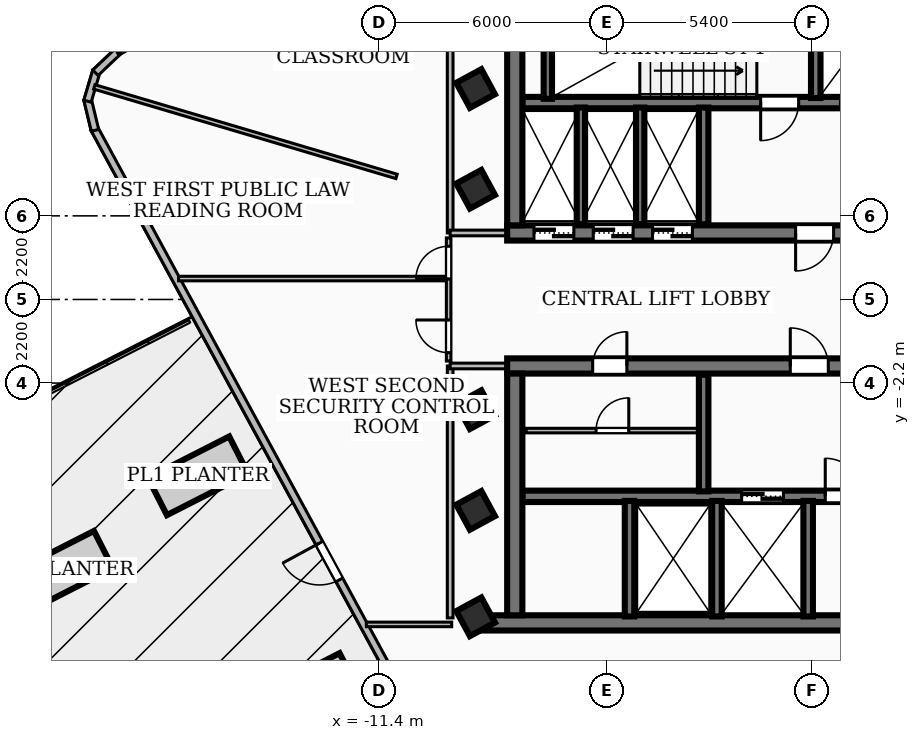
"""IFC4 building model, lengths in metres.
Left out: names, types, materials, properties, quantities, classifications, styles, units other than length and angle.
Written with IfcOpenShell. Run it as: python <this file> out.ifc"""

import sys

from ifc_helpers import new_model, si_unit, direction, frame, frame_2d, origin, origin_2d, place, context, subcontext, project, spatial, rectangle, extrude, element, fill, save


model = new_model("IFC4")
c1 = context("Model", 3, precision=1e-05, world=origin(), true_north=direction((0.0, 1.0)))
c2 = subcontext(c1, "Body", "Model", "MODEL_VIEW")
j1 = project(units=[si_unit("LENGTHUNIT", "METRE"), si_unit("PLANEANGLEUNIT", "RADIAN")], contexts=[c1])
p1 = place(None, origin())
s1 = spatial("IfcSite", under=j1, at=p1, CompositionType="ELEMENT")
p2 = place(p1, origin())
s2 = spatial("IfcBuilding", under=s1, at=p2, CompositionType="ELEMENT")
p3 = place(p2, frame((0.0, 0.0, 200.88)))
s3 = spatial("IfcBuildingStorey", under=s2, at=p3, CompositionType="ELEMENT", Elevation=200.88)
p4 = place(p3, frame((8.02, 1.75, 0.0), z_axis=(0.0, 0.0, 1.0), x_axis=(-1.0, 0.0, 0.0)))
e1 = element("IfcWall", 1, at=p4, inside=s3, PredefinedType="SHEAR", context=c2, shape_type="SweptSolid", body=[
    extrude(rectangle(XDim=16.04, YDim=0.4, at=frame_2d((8.02, 0.0))), origin(), (0.0, 0.0, 1.0), 4.06),
])
p5 = place(p4, frame((7.45, 0.0, 0.0)))
e2 = element("IfcOpeningElement", 2, at=p5, cuts=e1, PredefinedType="OPENING", context=c2, shape_type="SweptSolid", body=[
    extrude(rectangle(XDim=1.0, YDim=2.1, at=frame_2d((0.5, 1.05))), frame((0.0, 0.21, 0.0), z_axis=(0.0, -1.0, 0.0), x_axis=(1.0, 0.0, 0.0)), (0.0, 0.0, 1.0), 0.42),
])
p6 = place(p4, frame((14.285, 0.0, 0.0)))
e3 = element("IfcOpeningElement", 3, at=p6, cuts=e1, PredefinedType="OPENING", context=c2, shape_type="SweptSolid", body=[
    extrude(rectangle(XDim=1.05, YDim=2.15, at=frame_2d((0.525, 1.075))), frame((0.0, 0.21, 0.0), z_axis=(0.0, -1.0, 0.0), x_axis=(1.0, 0.0, 0.0)), (0.0, 0.0, 1.0), 0.42),
])
p7 = place(p4, frame((12.725, 0.0, 0.0)))
e4 = element("IfcOpeningElement", 4, at=p7, cuts=e1, PredefinedType="OPENING", context=c2, shape_type="SweptSolid", body=[
    extrude(rectangle(XDim=1.05, YDim=2.15, at=frame_2d((0.525, 1.075))), frame((0.0, 0.21, 0.0), z_axis=(0.0, -1.0, 0.0), x_axis=(1.0, 0.0, 0.0)), (0.0, 0.0, 1.0), 0.42),
])
p8 = place(p4, frame((11.165, 0.0, 0.0)))
e5 = element("IfcOpeningElement", 5, at=p8, cuts=e1, PredefinedType="OPENING", context=c2, shape_type="SweptSolid", body=[
    extrude(rectangle(XDim=1.05, YDim=2.15, at=frame_2d((0.525, 1.075))), frame((0.0, 0.21, 0.0), z_axis=(0.0, -1.0, 0.0), x_axis=(1.0, 0.0, 0.0)), (0.0, 0.0, 1.0), 0.42),
])
p9 = place(p4, frame((3.85, 0.0, 0.0)))
e6 = element("IfcOpeningElement", 6, at=p9, cuts=e1, PredefinedType="OPENING", context=c2, shape_type="SweptSolid", body=[
    extrude(rectangle(XDim=0.9, YDim=2.06, at=frame_2d((0.45, 1.03))), frame((0.0, 0.21, 0.0), z_axis=(0.0, -1.0, 0.0), x_axis=(1.0, 0.0, 0.0)), (0.0, 0.0, 1.0), 0.42),
])
p10 = place(p4, frame((2.35, 0.0, 0.0)))
e7 = element("IfcOpeningElement", 7, at=p10, cuts=e1, PredefinedType="OPENING", context=c2, shape_type="SweptSolid", body=[
    extrude(rectangle(XDim=0.9, YDim=2.06, at=frame_2d((0.45, 1.03))), frame((0.0, 0.21, 0.0), z_axis=(0.0, -1.0, 0.0), x_axis=(1.0, 0.0, 0.0)), (0.0, 0.0, 1.0), 0.42),
])
p11 = place(p4, frame((0.8, 0.0, 0.0)))
e8 = element("IfcOpeningElement", 8, at=p11, cuts=e1, PredefinedType="OPENING", context=c2, shape_type="SweptSolid", body=[
    extrude(rectangle(XDim=0.9, YDim=2.06, at=frame_2d((0.45, 1.03))), frame((0.0, 0.21, 0.0), z_axis=(0.0, -1.0, 0.0), x_axis=(1.0, 0.0, 0.0)), (0.0, 0.0, 1.0), 0.42),
])
p12 = place(p3, frame((-7.82, 1.95, 0.0), z_axis=(0.0, 0.0, 1.0), x_axis=(0.0, 1.0, 0.0)))
e9 = element("IfcWall", 9, at=p12, inside=s3, PredefinedType="SHEAR", context=c2, shape_type="SweptSolid", body=[
    extrude(rectangle(XDim=6.36, YDim=0.4, at=frame_2d((3.18, 0.0))), origin(), (0.0, 0.0, 1.0), 4.06),
])
p13 = place(p3, frame((7.62, 5.18, 0.0), z_axis=(0.0, 0.0, 1.0), x_axis=(-1.0, 0.0, 0.0)))
e10 = element("IfcWall", 10, at=p13, inside=s3, PredefinedType="SOLIDWALL", context=c2, shape_type="SweptSolid", body=[
    extrude(rectangle(XDim=15.24, YDim=0.3, at=frame_2d((7.62, 0.0))), origin(), (0.0, 0.0, 1.0), 4.06),
])
p14 = place(p13, frame((5.77, 0.0, 0.0)))
e11 = element("IfcOpeningElement", 11, at=p14, cuts=e10, PredefinedType="OPENING", context=c2, shape_type="SweptSolid", body=[
    extrude(rectangle(XDim=1.1, YDim=2.15, at=frame_2d((0.55, 1.075))), frame((0.0, 0.16, 0.0), z_axis=(0.0, -1.0, 0.0), x_axis=(1.0, 0.0, 0.0)), (0.0, 0.0, 1.0), 0.32),
])
p15 = place(p13, frame((2.97, 0.0, 0.0)))
e12 = element("IfcOpeningElement", 12, at=p15, cuts=e10, PredefinedType="OPENING", context=c2, shape_type="SweptSolid", body=[
    extrude(rectangle(XDim=1.1, YDim=2.15, at=frame_2d((0.55, 1.075))), frame((0.0, 0.16, 0.0), z_axis=(0.0, -1.0, 0.0), x_axis=(1.0, 0.0, 0.0)), (0.0, 0.0, 1.0), 0.32),
])
p16 = place(p13, frame((7.97, 0.0, 0.0)))
e13 = element("IfcOpeningElement", 13, at=p16, cuts=e10, PredefinedType="OPENING", context=c2, shape_type="SweptSolid", body=[
    extrude(rectangle(XDim=1.0, YDim=2.1, at=frame_2d((0.5, 1.05))), frame((0.0, 0.16, 0.0), z_axis=(0.0, -1.0, 0.0), x_axis=(1.0, 0.0, 0.0)), (0.0, 0.0, 1.0), 0.32),
])
p17 = place(p3, frame((8.78, -8.51, 0.0), z_axis=(0.0, 0.0, 1.0), x_axis=(-1.0, 0.0, 0.0)))
e14 = element("IfcWall", 14, at=p17, inside=s3, PredefinedType="SHEAR", context=c2, shape_type="SweptSolid", body=[
    extrude(rectangle(XDim=17.56, YDim=0.4, at=frame_2d((8.78, 0.0))), origin(), (0.0, 0.0, 1.0), 4.06),
])
p18 = place(p3, frame((-8.02, -1.75, 0.0), z_axis=(0.0, 0.0, 1.0), x_axis=(1.0, 0.0, 0.0)))
e15 = element("IfcWall", 15, at=p18, inside=s3, PredefinedType="SHEAR", context=c2, shape_type="SweptSolid", body=[
    extrude(rectangle(XDim=16.04, YDim=0.4, at=frame_2d((8.02, 0.0))), origin(), (0.0, 0.0, 1.0), 4.06),
])
p19 = place(p18, frame((7.45, 0.0, 0.0)))
e16 = element("IfcOpeningElement", 16, at=p19, cuts=e15, PredefinedType="OPENING", context=c2, shape_type="SweptSolid", body=[
    extrude(rectangle(XDim=1.0, YDim=2.1, at=frame_2d((0.5, 1.05))), frame((0.0, 0.21, 0.0), z_axis=(0.0, -1.0, 0.0), x_axis=(1.0, 0.0, 0.0)), (0.0, 0.0, 1.0), 0.42),
])
p20 = place(p18, frame((12.65, 0.0, 0.0)))
e17 = element("IfcOpeningElement", 17, at=p20, cuts=e15, PredefinedType="OPENING", context=c2, shape_type="SweptSolid", body=[
    extrude(rectangle(XDim=0.9, YDim=2.06, at=frame_2d((0.45, 1.03))), frame((0.0, 0.21, 0.0), z_axis=(0.0, -1.0, 0.0), x_axis=(1.0, 0.0, 0.0)), (0.0, 0.0, 1.0), 0.42),
])
p21 = place(p18, frame((2.25, 0.0, 0.0)))
e18 = element("IfcOpeningElement", 18, at=p21, cuts=e15, PredefinedType="OPENING", context=c2, shape_type="SweptSolid", body=[
    extrude(rectangle(XDim=0.9, YDim=2.06, at=frame_2d((0.45, 1.03))), frame((0.0, 0.21, 0.0), z_axis=(0.0, -1.0, 0.0), x_axis=(1.0, 0.0, 0.0)), (0.0, 0.0, 1.0), 0.42),
])
p22 = place(p3, frame((-7.82, -8.31, 0.0), z_axis=(0.0, 0.0, 1.0), x_axis=(0.0, 1.0, 0.0)))
e19 = element("IfcWall", 19, at=p22, inside=s3, PredefinedType="SHEAR", context=c2, shape_type="SweptSolid", body=[
    extrude(rectangle(XDim=6.36, YDim=0.4, at=frame_2d((3.18, 0.0))), origin(), (0.0, 0.0, 1.0), 4.06),
])
p23 = place(p3, frame((-7.62, -5.18, 0.0), z_axis=(0.0, 0.0, 1.0), x_axis=(1.0, 0.0, 0.0)))
e20 = element("IfcWall", 20, at=p23, inside=s3, PredefinedType="SOLIDWALL", context=c2, shape_type="SweptSolid", body=[
    extrude(rectangle(XDim=15.24, YDim=0.3, at=frame_2d((7.62, 0.0))), origin(), (0.0, 0.0, 1.0), 4.06),
])
p24 = place(p23, frame((5.77, 0.0, 0.0)))
e21 = element("IfcOpeningElement", 21, at=p24, cuts=e20, PredefinedType="OPENING", context=c2, shape_type="SweptSolid", body=[
    extrude(rectangle(XDim=1.1, YDim=2.15, at=frame_2d((0.55, 1.075))), frame((0.0, 0.16, 0.0), z_axis=(0.0, -1.0, 0.0), x_axis=(1.0, 0.0, 0.0)), (0.0, 0.0, 1.0), 0.32),
])
p25 = place(p23, frame((7.97, 0.0, 0.0)))
e22 = element("IfcOpeningElement", 22, at=p25, cuts=e20, PredefinedType="OPENING", context=c2, shape_type="SweptSolid", body=[
    extrude(rectangle(XDim=1.0, YDim=2.1, at=frame_2d((0.5, 1.05))), frame((0.0, 0.16, 0.0), z_axis=(0.0, -1.0, 0.0), x_axis=(1.0, 0.0, 0.0)), (0.0, 0.0, 1.0), 0.32),
])
p26 = place(p3, frame((-6.95, 5.28, 0.0), z_axis=(0.0, 0.0, 1.0), x_axis=(0.0, 1.0, 0.0)))
e23 = element("IfcWall", 23, at=p26, inside=s3, PredefinedType="SOLIDWALL", context=c2, shape_type="SweptSolid", body=[
    extrude(rectangle(XDim=3.06, YDim=0.22, at=frame_2d((1.53, 0.0))), origin(), (0.0, 0.0, 1.0), 4.06),
])
p27 = place(p3, frame((0.1, 5.3, 0.0), z_axis=(0.0, 0.0, 1.0), x_axis=(0.0, 1.0, 0.0)))
e24 = element("IfcWall", 24, at=p27, inside=s3, PredefinedType="SOLIDWALL", context=c2, shape_type="SweptSolid", body=[
    extrude(rectangle(XDim=3.04, YDim=0.25, at=frame_2d((1.52, 0.0))), origin(), (0.0, 0.0, 1.0), 4.06),
])
p28 = place(p3, frame((-2.85, 1.98, 0.0), z_axis=(0.0, 0.0, 1.0), x_axis=(0.0, 1.0, 0.0)))
e25 = element("IfcWall", 25, at=p28, inside=s3, PredefinedType="SOLIDWALL", context=c2, shape_type="SweptSolid", body=[
    extrude(rectangle(XDim=3.07, YDim=0.25, at=frame_2d((1.535, 0.0))), origin(), (0.0, 0.0, 1.0), 4.06),
])
for number, where, z_axis, x_axis in (
    (26, (-0.1, -8.34, 0.0), (0.0, 0.0, 1.0), (0.0, 1.0, 0.0)),
    (27, (-2.5, -8.34, 0.0), (0.0, 0.0, 1.0), (0.0, 1.0, 0.0)),
    (28, (-4.8, -8.34, 0.0), (0.0, 0.0, 1.0), (0.0, 1.0, 0.0)),
):
    element("IfcWall", number, at=place(p3, frame(where, z_axis=z_axis, x_axis=x_axis)), inside=s3, PredefinedType="SOLIDWALL", context=c2, shape_type="SweptSolid", body=[
        extrude(rectangle(XDim=3.04, YDim=0.25, at=frame_2d((1.52, 0.0))), origin(), (0.0, 0.0, 1.0), 4.06),
    ])
p29 = place(p3, frame((-2.85, -5.05, 0.0), z_axis=(0.0, 0.0, 1.0), x_axis=(0.0, 1.0, 0.0)))
e29 = element("IfcWall", 29, at=p29, inside=s3, PredefinedType="SOLIDWALL", context=c2, shape_type="SweptSolid", body=[
    extrude(rectangle(XDim=3.07, YDim=0.25, at=frame_2d((1.535, 0.0))), origin(), (0.0, 0.0, 1.0), 4.06),
])
for number, where, z_axis, x_axis in (
    (30, (-6.08, 1.98, 0.0), (0.0, 0.0, 1.0), (0.0, 1.0, 0.0)),
    (31, (-4.52, 1.98, 0.0), (0.0, 0.0, 1.0), (0.0, 1.0, 0.0)),
):
    element("IfcWall", number, at=place(p3, frame(where, z_axis=z_axis, x_axis=x_axis)), inside=s3, PredefinedType="SOLIDWALL", context=c2, shape_type="SweptSolid", body=[
        extrude(rectangle(XDim=3.07, YDim=0.22, at=frame_2d((1.535, 0.0))), origin(), (0.0, 0.0, 1.0), 4.06),
    ])
for number, where, z_axis, x_axis in (
    (32, (-8.85, -5.55, 0.0), (0.0, 0.0, 1.0), (0.879, 0.477, 0.0)),
    (33, (-8.85, -2.9, 0.0), (0.0, 0.0, 1.0), (0.879, 0.477, 0.0)),
    (34, (-8.85, 2.9, 0.0), (0.0, 0.0, 1.0), (0.879, 0.477, 0.0)),
    (35, (-8.85, 5.55, 0.0), (0.0, 0.0, 1.0), (0.879, 0.477, 0.0)),
    (36, (-8.85, -8.35, 0.0), (0.0, 0.0, 1.0), (0.879, 0.477, 0.0)),
):
    element("IfcColumn", number, at=place(p3, frame(where, z_axis=z_axis, x_axis=x_axis)), inside=s3, PredefinedType="COLUMN", context=c2, shape_type="SweptSolid", body=[
        extrude(rectangle(XDim=0.75, YDim=0.75, at=origin_2d()), origin(), (0.0, 0.0, 1.0), 4.32),
    ])
p30 = place(p3, frame((-6.514, -18.286, 0.0), z_axis=(0.0, 0.0, 1.0), x_axis=(-0.477173953596, 0.878808863183, 0.0)))
e37 = element("IfcWall", 37, at=p30, inside=s3, PredefinedType="SOLIDWALL", context=c2, shape_type="SweptSolid", body=[
    extrude(rectangle(XDim=25.924, YDim=0.2, at=frame_2d((12.962, 0.0))), origin(), (0.0, 0.0, 1.0), 4.06),
])
p31 = place(p30, frame((12.412, 0.0, 0.0)))
e38 = element("IfcOpeningElement", 38, at=p31, cuts=e37, PredefinedType="OPENING", context=c2, shape_type="SweptSolid", body=[
    extrude(rectangle(XDim=1.1, YDim=2.1, at=frame_2d((0.55, 1.05))), frame((0.0, 0.11, 0.0), z_axis=(0.0, -1.0, 0.0), x_axis=(1.0, 0.0, 0.0)), (0.0, 0.0, 1.0), 0.22),
])
p32 = place(p3, frame((-18.866, 4.45, 0.0), z_axis=(0.0, 0.0, 1.0), x_axis=(-0.233890685703, 0.972262900219, 0.0)))
e39 = element("IfcWall", 39, at=p32, inside=s3, PredefinedType="SOLIDWALL", context=c2, shape_type="SweptSolid", body=[
    extrude(rectangle(XDim=0.838, YDim=0.2, at=frame_2d((0.419, 0.0))), origin(), (0.0, 0.0, 1.0), 4.06),
])
p33 = place(p3, frame((-19.063, 5.217, 0.0), z_axis=(0.0, 0.0, 1.0), x_axis=(0.283866368736, 0.958863850972, 0.0)))
e40 = element("IfcWall", 40, at=p33, inside=s3, PredefinedType="SOLIDWALL", context=c2, shape_type="SweptSolid", body=[
    extrude(rectangle(XDim=0.824, YDim=0.2, at=frame_2d((0.412, 0.0))), origin(), (0.0, 0.0, 1.0), 4.06),
])
p34 = place(p3, frame((-18.854, 5.966, 0.0), z_axis=(0.0, 0.0, 1.0), x_axis=(0.725362992084, 0.688366566384, 0.0)))
e41 = element("IfcWall", 41, at=p34, inside=s3, PredefinedType="SOLIDWALL", context=c2, shape_type="SweptSolid", body=[
    extrude(rectangle(XDim=0.838, YDim=0.2, at=frame_2d((0.419, 0.0))), origin(), (0.0, 0.0, 1.0), 4.06),
])
p35 = place(p3, frame((-7.52, -3.45, 0.0), z_axis=(0.0, 0.0, 1.0), x_axis=(1.0, 0.0, 0.0)))
e42 = element("IfcWall", 42, at=p35, inside=s3, PredefinedType="PARTITIONING", context=c2, shape_type="SweptSolid", body=[
    extrude(rectangle(XDim=4.54, YDim=0.12, at=frame_2d((2.27, 0.0))), origin(), (0.0, 0.0, 1.0), 4.06),
])
p36 = place(p35, frame((1.84, 0.0, 0.0)))
e43 = element("IfcOpeningElement", 43, at=p36, cuts=e42, PredefinedType="OPENING", context=c2, shape_type="SweptSolid", body=[
    extrude(rectangle(XDim=0.86, YDim=2.04, at=frame_2d((0.43, 1.02))), frame((0.0, 0.07, 0.0), z_axis=(0.0, -1.0, 0.0), x_axis=(1.0, 0.0, 0.0)), (0.0, 0.0, 1.0), 0.14),
])
p37 = place(p3, frame((-9.52, 1.75, 0.0), z_axis=(0.0, 0.0, 1.0), x_axis=(0.0, 1.0, 0.0)))
e44 = element("IfcWall", 44, at=p37, inside=s3, PredefinedType="PARTITIONING", context=c2, shape_type="SweptSolid", body=[
    extrude(rectangle(XDim=6.63, YDim=0.15, at=frame_2d((3.315, 0.0))), origin(), (0.0, 0.0, 1.0), 4.06),
])
p38 = place(p3, frame((-7.85, 1.75, 0.0), z_axis=(0.0, 0.0, 1.0), x_axis=(-1.0, 0.0, 0.0)))
e45 = element("IfcWall", 45, at=p38, inside=s3, PredefinedType="PARTITIONING", context=c2, shape_type="SweptSolid", body=[
    extrude(rectangle(XDim=1.67, YDim=0.15, at=frame_2d((0.835, 0.0))), origin(), (0.0, 0.0, 1.0), 3.29),
])
p39 = place(p3, frame((-9.52, -8.38, 0.0), z_axis=(0.0, 0.0, 1.0), x_axis=(0.0, 1.0, 0.0)))
e46 = element("IfcWall", 46, at=p39, inside=s3, PredefinedType="PARTITIONING", context=c2, shape_type="SweptSolid", body=[
    extrude(rectangle(XDim=6.63, YDim=0.15, at=frame_2d((3.315, 0.0))), origin(), (0.0, 0.0, 1.0), 4.06),
])
p40 = place(p3, frame((-7.85, -1.75, 0.0), z_axis=(0.0, 0.0, 1.0), x_axis=(-1.0, 0.0, 0.0)))
e47 = element("IfcWall", 47, at=p40, inside=s3, PredefinedType="PARTITIONING", context=c2, shape_type="SweptSolid", body=[
    extrude(rectangle(XDim=1.67, YDim=0.15, at=frame_2d((0.835, 0.0))), origin(), (0.0, 0.0, 1.0), 3.29),
])
p41 = place(p3, frame((-16.667, 0.55, 0.0), z_axis=(0.0, 0.0, 1.0), x_axis=(1.0, 0.0, 0.0)))
e48 = element("IfcWall", 48, at=p41, inside=s3, PredefinedType="PARTITIONING", context=c2, shape_type="SweptSolid", body=[
    extrude(rectangle(XDim=7.007, YDim=0.12, at=frame_2d((3.503, 0.0))), origin(), (0.0, 0.0, 1.0), 4.06),
])
p42 = place(p3, frame((-11.726, -8.55, 0.0), z_axis=(0.0, 0.0, 1.0), x_axis=(1.0, 0.0, 0.0)))
e49 = element("IfcWall", 49, at=p42, inside=s3, PredefinedType="PARTITIONING", context=c2, shape_type="SweptSolid", body=[
    extrude(rectangle(XDim=2.246, YDim=0.12, at=frame_2d((1.123, 0.0))), origin(), (0.0, 0.0, 1.0), 4.06),
])
p43 = place(p3, frame((-9.56, -1.62, 0.0), z_axis=(0.0, 0.0, 1.0), x_axis=(0.0, 1.0, 0.0)))
e50 = element("IfcWall", 50, at=p43, inside=s3, PredefinedType="PARTITIONING", context=c2, shape_type="SweptSolid", body=[
    extrude(rectangle(XDim=3.24, YDim=0.12, at=frame_2d((1.62, 0.0))), origin(), (0.0, 0.0, 1.0), 4.06),
])
p44 = place(p43, frame((0.22, 0.0, 0.0)))
e51 = element("IfcOpeningElement", 51, at=p44, cuts=e50, PredefinedType="OPENING", context=c2, shape_type="SweptSolid", body=[
    extrude(rectangle(XDim=0.86, YDim=2.04, at=frame_2d((0.43, 1.02))), frame((0.0, 0.07, 0.0), z_axis=(0.0, -1.0, 0.0), x_axis=(1.0, 0.0, 0.0)), (0.0, 0.0, 1.0), 0.14),
])
p45 = place(p43, frame((2.16, 0.0, 0.0)))
e52 = element("IfcOpeningElement", 52, at=p45, cuts=e50, PredefinedType="OPENING", context=c2, shape_type="SweptSolid", body=[
    extrude(rectangle(XDim=0.86, YDim=2.04, at=frame_2d((0.43, 1.02))), frame((0.0, 0.07, 0.0), z_axis=(0.0, -1.0, 0.0), x_axis=(1.0, 0.0, 0.0)), (0.0, 0.0, 1.0), 0.14),
])
p46 = place(p3, frame((-10.931, 3.238, 0.0), z_axis=(0.0, 0.0, 1.0), x_axis=(-0.958847390296, 0.283921964845, 0.0)))
e53 = element("IfcWall", 53, at=p46, inside=s3, PredefinedType="PARTITIONING", context=c2, shape_type="SweptSolid", body=[
    extrude(rectangle(XDim=8.294, YDim=0.12, at=frame_2d((4.147, 0.0))), origin(), (0.0, 0.0, 1.0), 4.06),
])
p47 = place(p3, frame((15.624, -7.777, 0.0), z_axis=(0.0, 0.0, 1.0), x_axis=(-0.878797236248, -0.477195366242, 0.0)))
e54 = element("IfcWall", 54, at=p47, inside=s3, PredefinedType="PARTITIONING", context=c2, shape_type="SweptSolid", body=[
    extrude(rectangle(XDim=20.04, YDim=0.12, at=frame_2d((10.02, 0.0))), origin(), (0.0, 0.0, 1.0), 3.43),
])
p48 = place(p47, frame((9.419, 0.0, 0.0)))
e55 = element("IfcOpeningElement", 55, at=p48, cuts=e54, PredefinedType="OPENING", context=c2, shape_type="SweptSolid", body=[
    extrude(rectangle(XDim=1.2, YDim=2.1, at=frame_2d((0.6, 1.05))), frame((0.0, 0.07, 0.0), z_axis=(0.0, -1.0, 0.0), x_axis=(1.0, 0.0, 0.0)), (0.0, 0.0, 1.0), 0.14),
])
p49 = place(p31, origin())
e56 = element("IfcDoor", 56, at=p49, inside=s3, OperationType="SINGLE_SWING_RIGHT", PredefinedType="DOOR", context=c2, shape_type="SweptSolid", body=[
    extrude(rectangle(XDim=1.1, YDim=2.1, at=frame_2d((0.55, 1.05))), frame((0.0, 0.025, 0.0), z_axis=(0.0, -1.0, 0.0), x_axis=(1.0, 0.0, 0.0)), (0.0, 0.0, 1.0), 0.05),
])
fill(e38, e56)
p50 = place(p5, origin())
e57 = element("IfcDoor", 57, at=p50, inside=s3, OperationType="SINGLE_SWING_RIGHT", PredefinedType="DOOR", context=c2, shape_type="SweptSolid", body=[
    extrude(rectangle(XDim=1.0, YDim=2.1, at=frame_2d((0.5, 1.05))), frame((0.0, 0.025, 0.0), z_axis=(0.0, -1.0, 0.0), x_axis=(1.0, 0.0, 0.0)), (0.0, 0.0, 1.0), 0.05),
])
fill(e2, e57)
p51 = place(p19, origin())
e58 = element("IfcDoor", 58, at=p51, inside=s3, OperationType="SINGLE_SWING_LEFT", PredefinedType="DOOR", context=c2, shape_type="SweptSolid", body=[
    extrude(rectangle(XDim=1.0, YDim=2.1, at=frame_2d((0.5, 1.05))), frame((0.0, 0.025, 0.0), z_axis=(0.0, -1.0, 0.0), x_axis=(1.0, 0.0, 0.0)), (0.0, 0.0, 1.0), 0.05),
])
fill(e16, e58)
p52 = place(p16, origin())
e59 = element("IfcDoor", 59, at=p52, inside=s3, OperationType="SINGLE_SWING_RIGHT", PredefinedType="DOOR", context=c2, shape_type="SweptSolid", body=[
    extrude(rectangle(XDim=1.0, YDim=2.1, at=frame_2d((0.5, 1.05))), frame((0.0, 0.025, 0.0), z_axis=(0.0, -1.0, 0.0), x_axis=(1.0, 0.0, 0.0)), (0.0, 0.0, 1.0), 0.05),
])
fill(e13, e59)
p53 = place(p24, origin())
e60 = element("IfcDoor", 60, at=p53, inside=s3, OperationType="DOUBLE_DOOR_SLIDING", PredefinedType="DOOR", context=c2, shape_type="SweptSolid", body=[
    extrude(rectangle(XDim=1.1, YDim=2.15, at=frame_2d((0.55, 1.075))), frame((0.0, 0.025, 0.0), z_axis=(0.0, -1.0, 0.0), x_axis=(1.0, 0.0, 0.0)), (0.0, 0.0, 1.0), 0.05),
])
fill(e21, e60)
p54 = place(p25, origin())
e61 = element("IfcDoor", 61, at=p54, inside=s3, OperationType="SINGLE_SWING_LEFT", PredefinedType="DOOR", context=c2, shape_type="SweptSolid", body=[
    extrude(rectangle(XDim=1.0, YDim=2.1, at=frame_2d((0.5, 1.05))), frame((0.0, 0.025, 0.0), z_axis=(0.0, -1.0, 0.0), x_axis=(1.0, 0.0, 0.0)), (0.0, 0.0, 1.0), 0.05),
])
fill(e22, e61)
p55 = place(p6, origin())
e62 = element("IfcDoor", 62, at=p55, inside=s3, OperationType="DOUBLE_DOOR_SLIDING", PredefinedType="DOOR", context=c2, shape_type="SweptSolid", body=[
    extrude(rectangle(XDim=1.05, YDim=2.15, at=frame_2d((0.525, 1.075))), frame((0.0, 0.025, 0.0), z_axis=(0.0, -1.0, 0.0), x_axis=(1.0, 0.0, 0.0)), (0.0, 0.0, 1.0), 0.05),
])
fill(e3, e62)
p56 = place(p7, origin())
e63 = element("IfcDoor", 63, at=p56, inside=s3, OperationType="DOUBLE_DOOR_SLIDING", PredefinedType="DOOR", context=c2, shape_type="SweptSolid", body=[
    extrude(rectangle(XDim=1.05, YDim=2.15, at=frame_2d((0.525, 1.075))), frame((0.0, 0.025, 0.0), z_axis=(0.0, -1.0, 0.0), x_axis=(1.0, 0.0, 0.0)), (0.0, 0.0, 1.0), 0.05),
])
fill(e4, e63)
p57 = place(p8, origin())
e64 = element("IfcDoor", 64, at=p57, inside=s3, OperationType="DOUBLE_DOOR_SLIDING", PredefinedType="DOOR", context=c2, shape_type="SweptSolid", body=[
    extrude(rectangle(XDim=1.05, YDim=2.15, at=frame_2d((0.525, 1.075))), frame((0.0, 0.025, 0.0), z_axis=(0.0, -1.0, 0.0), x_axis=(1.0, 0.0, 0.0)), (0.0, 0.0, 1.0), 0.05),
])
fill(e5, e64)
p58 = place(p21, origin())
e65 = element("IfcDoor", 65, at=p58, inside=s3, OperationType="SINGLE_SWING_RIGHT", PredefinedType="DOOR", context=c2, shape_type="SweptSolid", body=[
    extrude(rectangle(XDim=0.9, YDim=2.06, at=frame_2d((0.45, 1.03))), frame((0.0, 0.025, 0.0), z_axis=(0.0, -1.0, 0.0), x_axis=(1.0, 0.0, 0.0)), (0.0, 0.0, 1.0), 0.05),
])
fill(e18, e65)
p59 = place(p36, origin())
e66 = element("IfcDoor", 66, at=p59, inside=s3, OperationType="SINGLE_SWING_RIGHT", PredefinedType="DOOR", context=c2, shape_type="SweptSolid", body=[
    extrude(rectangle(XDim=0.86, YDim=2.04, at=frame_2d((0.43, 1.02))), frame((0.0, 0.025, 0.0), z_axis=(0.0, -1.0, 0.0), x_axis=(1.0, 0.0, 0.0)), (0.0, 0.0, 1.0), 0.05),
])
fill(e43, e66)
p60 = place(p44, origin())
e67 = element("IfcDoor", 67, at=p60, inside=s3, OperationType="SINGLE_SWING_RIGHT", PredefinedType="DOOR", context=c2, shape_type="SweptSolid", body=[
    extrude(rectangle(XDim=0.86, YDim=2.04, at=frame_2d((0.43, 1.02))), frame((0.0, 0.025, 0.0), z_axis=(0.0, -1.0, 0.0), x_axis=(1.0, 0.0, 0.0)), (0.0, 0.0, 1.0), 0.05),
])
fill(e51, e67)
p61 = place(p45, origin())
e68 = element("IfcDoor", 68, at=p61, inside=s3, OperationType="SINGLE_SWING_LEFT", PredefinedType="DOOR", context=c2, shape_type="SweptSolid", body=[
    extrude(rectangle(XDim=0.86, YDim=2.04, at=frame_2d((0.43, 1.02))), frame((0.0, 0.025, 0.0), z_axis=(0.0, -1.0, 0.0), x_axis=(1.0, 0.0, 0.0)), (0.0, 0.0, 1.0), 0.05),
])
fill(e52, e68)
save(model, sys.argv[1])
